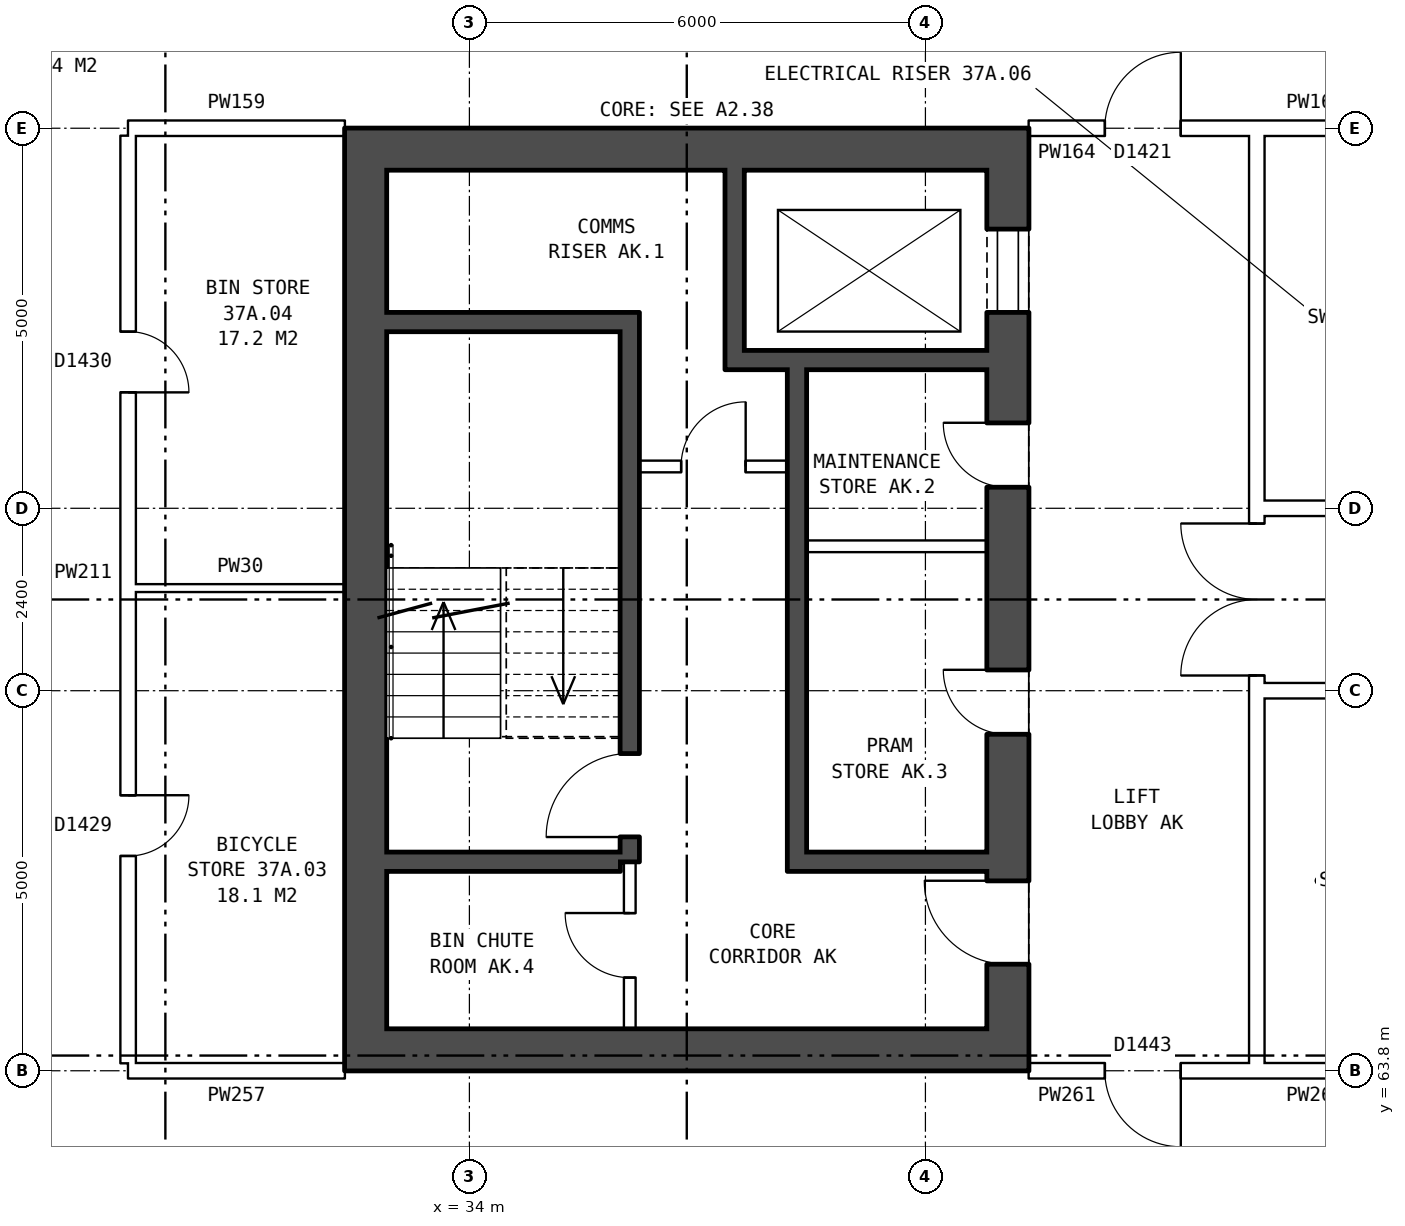
"""IFC4 building model, lengths in metres.
Left out: names, types, materials, properties, quantities, classifications, styles, units other than length and angle.
Written with IfcOpenShell. Run it as: python <this file> out.ifc"""

import sys

from ifc_helpers import new_model, si_unit, direction, frame, frame_2d, origin, place, context, subcontext, project, spatial, rectangle, extrude, element, fill, save


model = new_model("IFC4")
c1 = context("Model", 3, precision=1e-05, world=origin(), true_north=direction((0.0, 1.0)))
c2 = subcontext(c1, "Body", "Model", "MODEL_VIEW")
j1 = project(units=[si_unit("LENGTHUNIT", "METRE"), si_unit("PLANEANGLEUNIT", "RADIAN")], contexts=[c1])
p1 = place(None, origin())
s1 = spatial("IfcSite", under=j1, at=p1, CompositionType="ELEMENT")
p2 = place(p1, origin())
s2 = spatial("IfcBuilding", under=s1, at=p2, CompositionType="ELEMENT")
p3 = place(p2, frame((0.0, 0.0, 133.0)))
s3 = spatial("IfcBuildingStorey", under=s2, at=p3, CompositionType="ELEMENT", Elevation=133.0)
p4 = place(p3, frame((41.085, 76.2, 0.0), z_axis=(0.0, 0.0, 1.0), x_axis=(0.0, -1.0, 0.0)))
e1 = element("IfcWall", 1, at=p4, inside=s3, PredefinedType="SHEAR", context=c2, shape_type="SweptSolid", body=[
    extrude(rectangle(XDim=12.4, YDim=0.55, at=frame_2d((6.2, 0.0))), origin(), (0.0, 0.0, 1.0), 2.85),
])
p5 = place(p4, frame((1.325, 0.0, 0.0)))
e2 = element("IfcOpeningElement", 2, at=p5, cuts=e1, PredefinedType="OPENING", context=c2, shape_type="SweptSolid", body=[
    extrude(rectangle(XDim=1.1, YDim=2.1, at=frame_2d((0.55, 1.05))), frame((0.0, 0.285, 0.0), z_axis=(0.0, -1.0, 0.0), x_axis=(1.0, 0.0, 0.0)), (0.0, 0.0, 1.0), 0.57),
])
p6 = place(p4, frame((3.875, 0.0, 0.0)))
e3 = element("IfcOpeningElement", 3, at=p6, cuts=e1, PredefinedType="OPENING", context=c2, shape_type="SweptSolid", body=[
    extrude(rectangle(XDim=0.85, YDim=2.1, at=frame_2d((0.425, 1.05))), frame((0.0, 0.285, 0.0), z_axis=(0.0, -1.0, 0.0), x_axis=(1.0, 0.0, 0.0)), (0.0, 0.0, 1.0), 0.57),
])
p7 = place(p4, frame((7.125, 0.0, 0.0)))
e4 = element("IfcOpeningElement", 4, at=p7, cuts=e1, PredefinedType="OPENING", context=c2, shape_type="SweptSolid", body=[
    extrude(rectangle(XDim=0.85, YDim=2.1, at=frame_2d((0.425, 1.05))), frame((0.0, 0.285, 0.0), z_axis=(0.0, -1.0, 0.0), x_axis=(1.0, 0.0, 0.0)), (0.0, 0.0, 1.0), 0.57),
])
p8 = place(p4, frame((9.9, 0.0, 0.0)))
e5 = element("IfcOpeningElement", 5, at=p8, cuts=e1, PredefinedType="OPENING", context=c2, shape_type="SweptSolid", body=[
    extrude(rectangle(XDim=1.1, YDim=2.1, at=frame_2d((0.55, 1.05))), frame((0.0, 0.285, 0.0), z_axis=(0.0, -1.0, 0.0), x_axis=(1.0, 0.0, 0.0)), (0.0, 0.0, 1.0), 0.57),
])
p9 = place(p3, frame((32.635, 76.2, 0.0), z_axis=(0.0, 0.0, 1.0), x_axis=(0.0, -1.0, 0.0)))
e6 = element("IfcWall", 6, at=p9, inside=s3, PredefinedType="SHEAR", context=c2, shape_type="SweptSolid", body=[
    extrude(rectangle(XDim=12.4, YDim=0.55, at=frame_2d((6.2, 0.0))), origin(), (0.0, 0.0, 1.0), 2.85),
])
for number, where, z_axis, x_axis in (
    (7, (40.81, 75.925, 0.0), (0.0, 0.0, 1.0), (-1.0, 0.0, 0.0)),
    (8, (40.81, 64.075, 0.0), (0.0, 0.0, 1.0), (-1.0, 0.0, 0.0)),
):
    element("IfcWall", number, at=place(p3, frame(where, z_axis=z_axis, x_axis=x_axis)), inside=s3, PredefinedType="SHEAR", context=c2, shape_type="SweptSolid", body=[
        extrude(rectangle(XDim=7.9, YDim=0.55, at=frame_2d((3.95, 0.0))), origin(), (0.0, 0.0, 1.0), 2.85),
    ])
p10 = place(p3, frame((35.985, 73.65, 0.0), z_axis=(0.0, 0.0, 1.0), x_axis=(-1.0, 0.0, 0.0)))
e9 = element("IfcWall", 9, at=p10, inside=s3, PredefinedType="SHEAR", context=c2, shape_type="SweptSolid", body=[
    extrude(rectangle(XDim=3.075, YDim=0.25, at=frame_2d((1.538, 0.0))), origin(), (0.0, 0.0, 1.0), 2.85),
])
p11 = place(p3, frame((40.81, 73.15, 0.0), z_axis=(0.0, 0.0, 1.0), x_axis=(-1.0, 0.0, 0.0)))
e10 = element("IfcWall", 10, at=p11, inside=s3, PredefinedType="SHEAR", context=c2, shape_type="SweptSolid", body=[
    extrude(rectangle(XDim=3.445, YDim=0.25, at=frame_2d((1.723, 0.0))), origin(), (0.0, 0.0, 1.0), 2.85),
])
p12 = place(p3, frame((38.185, 71.75, 0.0), z_axis=(0.0, 0.0, 1.0), x_axis=(-1.0, 0.0, 0.0)))
e11 = element("IfcWall", 11, at=p12, inside=s3, PredefinedType="PARTITIONING", context=c2, shape_type="SweptSolid", body=[
    extrude(rectangle(XDim=1.95, YDim=0.15, at=frame_2d((0.975, 0.0))), origin(), (0.0, 0.0, 1.0), 2.85),
])
p13 = place(p12, frame((0.55, 0.0, 0.0)))
e12 = element("IfcOpeningElement", 12, at=p13, cuts=e11, PredefinedType="OPENING", context=c2, shape_type="SweptSolid", body=[
    extrude(rectangle(XDim=0.85, YDim=2.1, at=frame_2d((0.425, 1.05))), frame((0.0, 0.085, 0.0), z_axis=(0.0, -1.0, 0.0), x_axis=(1.0, 0.0, 0.0)), (0.0, 0.0, 1.0), 0.17),
])
p14 = place(p3, frame((40.81, 70.7, 0.0), z_axis=(0.0, 0.0, 1.0), x_axis=(-1.0, 0.0, 0.0)))
e13 = element("IfcWall", 13, at=p14, inside=s3, PredefinedType="PARTITIONING", context=c2, shape_type="SweptSolid", body=[
    extrude(rectangle(XDim=2.375, YDim=0.15, at=frame_2d((1.188, 0.0))), origin(), (0.0, 0.0, 1.0), 2.85),
])
p15 = place(p3, frame((40.81, 66.55, 0.0), z_axis=(0.0, 0.0, 1.0), x_axis=(-1.0, 0.0, 0.0)))
e14 = element("IfcWall", 14, at=p15, inside=s3, PredefinedType="SHEAR", context=c2, shape_type="SweptSolid", body=[
    extrude(rectangle(XDim=2.375, YDim=0.25, at=frame_2d((1.188, 0.0))), origin(), (0.0, 0.0, 1.0), 2.85),
])
p16 = place(p3, frame((35.985, 66.55, 0.0), z_axis=(0.0, 0.0, 1.0), x_axis=(-1.0, 0.0, 0.0)))
e15 = element("IfcWall", 15, at=p16, inside=s3, PredefinedType="SHEAR", context=c2, shape_type="SweptSolid", body=[
    extrude(rectangle(XDim=3.075, YDim=0.25, at=frame_2d((1.538, 0.0))), origin(), (0.0, 0.0, 1.0), 2.85),
])
p17 = place(p3, frame((38.31, 73.025, 0.0), z_axis=(0.0, 0.0, 1.0), x_axis=(0.0, -1.0, 0.0)))
e16 = element("IfcWall", 16, at=p17, inside=s3, PredefinedType="SHEAR", context=c2, shape_type="SweptSolid", body=[
    extrude(rectangle(XDim=6.6, YDim=0.25, at=frame_2d((3.3, 0.0))), origin(), (0.0, 0.0, 1.0), 2.85),
])
p18 = place(p3, frame((37.49, 75.65, 0.0), z_axis=(0.0, 0.0, 1.0), x_axis=(0.0, -1.0, 0.0)))
e17 = element("IfcWall", 17, at=p18, inside=s3, PredefinedType="SHEAR", context=c2, shape_type="SweptSolid", body=[
    extrude(rectangle(XDim=2.375, YDim=0.25, at=frame_2d((1.188, 0.0))), origin(), (0.0, 0.0, 1.0), 2.85),
])
p19 = place(p3, frame((36.11, 73.775, 0.0), z_axis=(0.0, 0.0, 1.0), x_axis=(0.0, -1.0, 0.0)))
e18 = element("IfcWall", 18, at=p19, inside=s3, PredefinedType="SHEAR", context=c2, shape_type="SweptSolid", body=[
    extrude(rectangle(XDim=7.225, YDim=0.25, at=frame_2d((3.612, 0.0))), origin(), (0.0, 0.0, 1.0), 2.85),
])
p20 = place(p19, frame((5.8, 0.0, 0.0)))
e19 = element("IfcOpeningElement", 19, at=p20, cuts=e18, PredefinedType="OPENING", context=c2, shape_type="SweptSolid", body=[
    extrude(rectangle(XDim=1.1, YDim=2.1, at=frame_2d((0.55, 1.05))), frame((0.0, 0.135, 0.0), z_axis=(0.0, -1.0, 0.0), x_axis=(1.0, 0.0, 0.0)), (0.0, 0.0, 1.0), 0.27),
])
p21 = place(p3, frame((36.11, 66.55, 0.0), z_axis=(0.0, 0.0, 1.0), x_axis=(0.0, -1.0, 0.0)))
e20 = element("IfcWall", 20, at=p21, inside=s3, PredefinedType="PARTITIONING", context=c2, shape_type="SweptSolid", body=[
    extrude(rectangle(XDim=2.2, YDim=0.15, at=frame_2d((1.1, 0.0))), origin(), (0.0, 0.0, 1.0), 2.85),
])
p22 = place(p21, frame((0.675, 0.0, 0.0)))
e21 = element("IfcOpeningElement", 21, at=p22, cuts=e20, PredefinedType="OPENING", context=c2, shape_type="SweptSolid", body=[
    extrude(rectangle(XDim=0.85, YDim=2.1, at=frame_2d((0.425, 1.05))), frame((0.0, 0.085, 0.0), z_axis=(0.0, -1.0, 0.0), x_axis=(1.0, 0.0, 0.0)), (0.0, 0.0, 1.0), 0.17),
])
p23 = place(p3, frame((44.36, 63.9, 0.0), z_axis=(0.0, 0.0, 1.0), x_axis=(0.0, 1.0, 0.0)))
e22 = element("IfcWall", 22, at=p23, inside=s3, PredefinedType="PARTITIONING", context=c2, shape_type="SweptSolid", body=[
    extrude(rectangle(XDim=12.2, YDim=0.2, at=frame_2d((6.1, 0.0))), origin(), (0.0, 0.0, 1.0), 2.85),
])
p24 = place(p23, frame((5.1, 0.0, 0.0)))
e23 = element("IfcOpeningElement", 23, at=p24, cuts=e22, PredefinedType="OPENING", context=c2, shape_type="SweptSolid", body=[
    extrude(rectangle(XDim=2.0, YDim=2.1, at=frame_2d((1.0, 1.05))), frame((0.0, 0.11, 0.0), z_axis=(0.0, -1.0, 0.0), x_axis=(1.0, 0.0, 0.0)), (0.0, 0.0, 1.0), 0.22),
])
p25 = place(p3, frame((29.51, 63.8, 0.0), z_axis=(0.0, 0.0, 1.0), x_axis=(1.0, 0.0, 0.0)))
e24 = element("IfcWall", 24, at=p25, inside=s3, PredefinedType="PARTITIONING", context=c2, shape_type="SweptSolid", body=[
    extrude(rectangle(XDim=2.85, YDim=0.2, at=frame_2d((1.425, 0.0))), origin(), (0.0, 0.0, 1.0), 2.85),
])
p26 = place(p3, frame((41.36, 63.8, 0.0), z_axis=(0.0, 0.0, 1.0), x_axis=(1.0, 0.0, 0.0)))
e25 = element("IfcWall", 25, at=p26, inside=s3, PredefinedType="PARTITIONING", context=c2, shape_type="SweptSolid", body=[
    extrude(rectangle(XDim=3.0, YDim=0.2, at=frame_2d((1.5, 0.0))), origin(), (0.0, 0.0, 1.0), 2.85),
])
p27 = place(p26, frame((1.0, 0.0, 0.0)))
e26 = element("IfcOpeningElement", 26, at=p27, cuts=e25, PredefinedType="OPENING", context=c2, shape_type="SweptSolid", body=[
    extrude(rectangle(XDim=1.0, YDim=2.1, at=frame_2d((0.5, 1.05))), frame((0.0, 0.11, 0.0), z_axis=(0.0, -1.0, 0.0), x_axis=(1.0, 0.0, 0.0)), (0.0, 0.0, 1.0), 0.22),
])
p28 = place(p3, frame((44.36, 63.8, 0.0), z_axis=(0.0, 0.0, 1.0), x_axis=(1.0, 0.0, 0.0)))
e27 = element("IfcWall", 27, at=p28, inside=s3, PredefinedType="PARTITIONING", context=c2, shape_type="SweptSolid", body=[
    extrude(rectangle(XDim=1.54, YDim=0.2, at=frame_2d((0.77, 0.0))), origin(), (0.0, 0.0, 1.0), 2.85),
])
p29 = place(p3, frame((44.36, 68.8, 0.0), z_axis=(0.0, 0.0, 1.0), x_axis=(1.0, 0.0, 0.0)))
e28 = element("IfcWall", 28, at=p29, inside=s3, PredefinedType="PARTITIONING", context=c2, shape_type="SweptSolid", body=[
    extrude(rectangle(XDim=19.28, YDim=0.2, at=frame_2d((9.64, 0.0))), origin(), (0.0, 0.0, 1.0), 2.85),
])
p30 = place(p29, frame((14.64, 0.0, 0.0)))
e29 = element("IfcOpeningElement", 29, at=p30, cuts=e28, PredefinedType="OPENING", context=c2, shape_type="SweptSolid", body=[
    extrude(rectangle(XDim=1.0, YDim=2.1, at=frame_2d((0.5, 1.05))), frame((0.0, 0.11, 0.0), z_axis=(0.0, -1.0, 0.0), x_axis=(1.0, 0.0, 0.0)), (0.0, 0.0, 1.0), 0.22),
])
p31 = place(p29, frame((8.64, 0.0, 0.0)))
e30 = element("IfcOpeningElement", 30, at=p31, cuts=e28, PredefinedType="OPENING", context=c2, shape_type="SweptSolid", body=[
    extrude(rectangle(XDim=1.0, YDim=2.1, at=frame_2d((0.5, 1.05))), frame((0.0, 0.11, 0.0), z_axis=(0.0, -1.0, 0.0), x_axis=(1.0, 0.0, 0.0)), (0.0, 0.0, 1.0), 0.22),
])
p32 = place(p29, frame((2.64, 0.0, 0.0)))
e31 = element("IfcOpeningElement", 31, at=p32, cuts=e28, PredefinedType="OPENING", context=c2, shape_type="SweptSolid", body=[
    extrude(rectangle(XDim=1.0, YDim=2.1, at=frame_2d((0.5, 1.05))), frame((0.0, 0.11, 0.0), z_axis=(0.0, -1.0, 0.0), x_axis=(1.0, 0.0, 0.0)), (0.0, 0.0, 1.0), 0.22),
])
p33 = place(p3, frame((29.61, 70.15, 0.0), z_axis=(0.0, 0.0, 1.0), x_axis=(1.0, 0.0, 0.0)))
e32 = element("IfcWall", 32, at=p33, inside=s3, PredefinedType="PARTITIONING", context=c2, shape_type="SweptSolid", body=[
    extrude(rectangle(XDim=2.75, YDim=0.1, at=frame_2d((1.375, 0.0))), origin(), (0.0, 0.0, 1.0), 2.85),
])
p34 = place(p3, frame((44.36, 71.2, 0.0), z_axis=(0.0, 0.0, 1.0), x_axis=(1.0, 0.0, 0.0)))
e33 = element("IfcWall", 33, at=p34, inside=s3, PredefinedType="PARTITIONING", context=c2, shape_type="SweptSolid", body=[
    extrude(rectangle(XDim=19.28, YDim=0.2, at=frame_2d((9.64, 0.0))), origin(), (0.0, 0.0, 1.0), 2.85),
])
p35 = place(p34, frame((17.46, 0.0, 0.0)))
e34 = element("IfcOpeningElement", 34, at=p35, cuts=e33, PredefinedType="OPENING", context=c2, shape_type="SweptSolid", body=[
    extrude(rectangle(XDim=1.0, YDim=2.1, at=frame_2d((0.5, 1.05))), frame((0.0, 0.11, 0.0), z_axis=(0.0, -1.0, 0.0), x_axis=(1.0, 0.0, 0.0)), (0.0, 0.0, 1.0), 0.22),
])
p36 = place(p34, frame((8.64, 0.0, 0.0)))
e35 = element("IfcOpeningElement", 35, at=p36, cuts=e33, PredefinedType="OPENING", context=c2, shape_type="SweptSolid", body=[
    extrude(rectangle(XDim=1.0, YDim=2.1, at=frame_2d((0.5, 1.05))), frame((0.0, 0.11, 0.0), z_axis=(0.0, -1.0, 0.0), x_axis=(1.0, 0.0, 0.0)), (0.0, 0.0, 1.0), 0.22),
])
p37 = place(p34, frame((2.64, 0.0, 0.0)))
e36 = element("IfcOpeningElement", 36, at=p37, cuts=e33, PredefinedType="OPENING", context=c2, shape_type="SweptSolid", body=[
    extrude(rectangle(XDim=1.0, YDim=2.1, at=frame_2d((0.5, 1.05))), frame((0.0, 0.11, 0.0), z_axis=(0.0, -1.0, 0.0), x_axis=(1.0, 0.0, 0.0)), (0.0, 0.0, 1.0), 0.22),
])
p38 = place(p3, frame((29.51, 76.2, 0.0), z_axis=(0.0, 0.0, 1.0), x_axis=(1.0, 0.0, 0.0)))
e37 = element("IfcWall", 37, at=p38, inside=s3, PredefinedType="PARTITIONING", context=c2, shape_type="SweptSolid", body=[
    extrude(rectangle(XDim=2.85, YDim=0.2, at=frame_2d((1.425, 0.0))), origin(), (0.0, 0.0, 1.0), 2.85),
])
p39 = place(p3, frame((41.36, 76.2, 0.0), z_axis=(0.0, 0.0, 1.0), x_axis=(1.0, 0.0, 0.0)))
e38 = element("IfcWall", 38, at=p39, inside=s3, PredefinedType="PARTITIONING", context=c2, shape_type="SweptSolid", body=[
    extrude(rectangle(XDim=3.0, YDim=0.2, at=frame_2d((1.5, 0.0))), origin(), (0.0, 0.0, 1.0), 2.85),
])
p40 = place(p39, frame((1.0, 0.0, 0.0)))
e39 = element("IfcOpeningElement", 39, at=p40, cuts=e38, PredefinedType="OPENING", context=c2, shape_type="SweptSolid", body=[
    extrude(rectangle(XDim=1.0, YDim=2.1, at=frame_2d((0.5, 1.05))), frame((0.0, 0.11, 0.0), z_axis=(0.0, -1.0, 0.0), x_axis=(1.0, 0.0, 0.0)), (0.0, 0.0, 1.0), 0.22),
])
p41 = place(p3, frame((44.36, 76.2, 0.0), z_axis=(0.0, 0.0, 1.0), x_axis=(1.0, 0.0, 0.0)))
e40 = element("IfcWall", 40, at=p41, inside=s3, PredefinedType="PARTITIONING", context=c2, shape_type="SweptSolid", body=[
    extrude(rectangle(XDim=1.54, YDim=0.2, at=frame_2d((0.77, 0.0))), origin(), (0.0, 0.0, 1.0), 2.85),
])
p42 = place(p3, frame((29.51, 63.9, 0.0), z_axis=(0.0, 0.0, 1.0), x_axis=(0.0, 1.0, 0.0)))
e41 = element("IfcWall", 41, at=p42, inside=s3, PredefinedType="PARTITIONING", context=c2, shape_type="SweptSolid", body=[
    extrude(rectangle(XDim=12.2, YDim=0.2, at=frame_2d((6.1, 0.0))), origin(), (0.0, 0.0, 1.0), 2.85),
])
p43 = place(p42, frame((2.725, 0.0, 0.0)))
e42 = element("IfcOpeningElement", 42, at=p43, cuts=e41, PredefinedType="OPENING", context=c2, shape_type="SweptSolid", body=[
    extrude(rectangle(XDim=0.8, YDim=2.1, at=frame_2d((0.4, 1.05))), frame((0.0, 0.11, 0.0), z_axis=(0.0, -1.0, 0.0), x_axis=(1.0, 0.0, 0.0)), (0.0, 0.0, 1.0), 0.22),
])
p44 = place(p42, frame((8.825, 0.0, 0.0)))
e43 = element("IfcOpeningElement", 43, at=p44, cuts=e41, PredefinedType="OPENING", context=c2, shape_type="SweptSolid", body=[
    extrude(rectangle(XDim=0.8, YDim=2.1, at=frame_2d((0.4, 1.05))), frame((0.0, 0.11, 0.0), z_axis=(0.0, -1.0, 0.0), x_axis=(1.0, 0.0, 0.0)), (0.0, 0.0, 1.0), 0.22),
])
p45 = place(p5, origin())
e44 = element("IfcDoor", 44, at=p45, inside=s3, OperationType="DOUBLE_DOOR_SLIDING", PredefinedType="DOOR", context=c2, shape_type="SweptSolid", body=[
    extrude(rectangle(XDim=1.1, YDim=2.1, at=frame_2d((0.55, 1.05))), frame((0.0, -0.21, 0.0), z_axis=(0.0, -1.0, 0.0), x_axis=(1.0, 0.0, 0.0)), (0.0, 0.0, 1.0), 0.05),
])
fill(e2, e44)
p46 = place(p6, frame((0.85, 0.0, 0.0), z_axis=(0.0, 0.0, 1.0), x_axis=(-1.0, 0.0, 0.0)))
e45 = element("IfcDoor", 45, at=p46, inside=s3, OperationType="SINGLE_SWING_RIGHT", PredefinedType="DOOR", context=c2, shape_type="SweptSolid", body=[
    extrude(rectangle(XDim=0.85, YDim=2.1, at=frame_2d((0.425, 1.05))), frame((0.0, 0.26, 0.0), z_axis=(0.0, -1.0, 0.0), x_axis=(1.0, 0.0, 0.0)), (0.0, 0.0, 1.0), 0.05),
])
fill(e3, e45)
p47 = place(p7, frame((0.85, 0.0, 0.0), z_axis=(0.0, 0.0, 1.0), x_axis=(-1.0, 0.0, 0.0)))
e46 = element("IfcDoor", 46, at=p47, inside=s3, OperationType="SINGLE_SWING_RIGHT", PredefinedType="DOOR", context=c2, shape_type="SweptSolid", body=[
    extrude(rectangle(XDim=0.85, YDim=2.1, at=frame_2d((0.425, 1.05))), frame((0.0, 0.26, 0.0), z_axis=(0.0, -1.0, 0.0), x_axis=(1.0, 0.0, 0.0)), (0.0, 0.0, 1.0), 0.05),
])
fill(e4, e46)
p48 = place(p8, frame((1.1, 0.0, 0.0), z_axis=(0.0, 0.0, 1.0), x_axis=(-1.0, 0.0, 0.0)))
e47 = element("IfcDoor", 47, at=p48, inside=s3, OperationType="SINGLE_SWING_RIGHT", PredefinedType="DOOR", context=c2, shape_type="SweptSolid", body=[
    extrude(rectangle(XDim=1.1, YDim=2.1, at=frame_2d((0.55, 1.05))), frame((0.0, 0.26, 0.0), z_axis=(0.0, -1.0, 0.0), x_axis=(1.0, 0.0, 0.0)), (0.0, 0.0, 1.0), 0.05),
])
fill(e5, e47)
p49 = place(p20, frame((1.1, 0.0, 0.0), z_axis=(0.0, 0.0, 1.0), x_axis=(-1.0, 0.0, 0.0)))
e48 = element("IfcDoor", 48, at=p49, inside=s3, OperationType="SINGLE_SWING_LEFT", PredefinedType="DOOR", context=c2, shape_type="SweptSolid", body=[
    extrude(rectangle(XDim=1.1, YDim=2.1, at=frame_2d((0.55, 1.05))), frame((0.0, 0.025, 0.0), z_axis=(0.0, -1.0, 0.0), x_axis=(1.0, 0.0, 0.0)), (0.0, 0.0, 1.0), 0.05),
])
fill(e19, e48)
p50 = place(p13, frame((0.85, 0.0, 0.0), z_axis=(0.0, 0.0, 1.0), x_axis=(-1.0, 0.0, 0.0)))
e49 = element("IfcDoor", 49, at=p50, inside=s3, OperationType="SINGLE_SWING_RIGHT", PredefinedType="DOOR", context=c2, shape_type="SweptSolid", body=[
    extrude(rectangle(XDim=0.85, YDim=2.1, at=frame_2d((0.425, 1.05))), frame((0.0, 0.025, 0.0), z_axis=(0.0, -1.0, 0.0), x_axis=(1.0, 0.0, 0.0)), (0.0, 0.0, 1.0), 0.05),
])
fill(e12, e49)
p51 = place(p22, frame((0.85, 0.0, 0.0), z_axis=(0.0, 0.0, 1.0), x_axis=(-1.0, 0.0, 0.0)))
e50 = element("IfcDoor", 50, at=p51, inside=s3, OperationType="SINGLE_SWING_RIGHT", PredefinedType="DOOR", context=c2, shape_type="SweptSolid", body=[
    extrude(rectangle(XDim=0.85, YDim=2.1, at=frame_2d((0.425, 1.05))), frame((0.0, 0.025, 0.0), z_axis=(0.0, -1.0, 0.0), x_axis=(1.0, 0.0, 0.0)), (0.0, 0.0, 1.0), 0.05),
])
fill(e21, e50)
p52 = place(p24, origin())
e51 = element("IfcDoor", 51, at=p52, inside=s3, OperationType="DOUBLE_DOOR_SINGLE_SWING", PredefinedType="DOOR", context=c2, shape_type="SweptSolid", body=[
    extrude(rectangle(XDim=2.0, YDim=2.1, at=frame_2d((1.0, 1.05))), frame((0.0, 0.025, 0.0), z_axis=(0.0, -1.0, 0.0), x_axis=(1.0, 0.0, 0.0)), (0.0, 0.0, 1.0), 0.05),
])
fill(e23, e51)
p53 = place(p27, frame((1.0, 0.0, 0.0), z_axis=(0.0, 0.0, 1.0), x_axis=(-1.0, 0.0, 0.0)))
e52 = element("IfcDoor", 52, at=p53, inside=s3, OperationType="SINGLE_SWING_LEFT", PredefinedType="DOOR", context=c2, shape_type="SweptSolid", body=[
    extrude(rectangle(XDim=1.0, YDim=2.1, at=frame_2d((0.5, 1.05))), frame((0.0, 0.025, 0.0), z_axis=(0.0, -1.0, 0.0), x_axis=(1.0, 0.0, 0.0)), (0.0, 0.0, 1.0), 0.05),
])
fill(e26, e52)
p54 = place(p40, origin())
e53 = element("IfcDoor", 53, at=p54, inside=s3, OperationType="SINGLE_SWING_RIGHT", PredefinedType="DOOR", context=c2, shape_type="SweptSolid", body=[
    extrude(rectangle(XDim=1.0, YDim=2.1, at=frame_2d((0.5, 1.05))), frame((0.0, 0.025, 0.0), z_axis=(0.0, -1.0, 0.0), x_axis=(1.0, 0.0, 0.0)), (0.0, 0.0, 1.0), 0.05),
])
fill(e39, e53)
p55 = place(p43, frame((0.8, 0.0, 0.0), z_axis=(0.0, 0.0, 1.0), x_axis=(-1.0, 0.0, 0.0)))
e54 = element("IfcDoor", 54, at=p55, inside=s3, OperationType="SINGLE_SWING_LEFT", PredefinedType="DOOR", context=c2, shape_type="SweptSolid", body=[
    extrude(rectangle(XDim=0.8, YDim=2.1, at=frame_2d((0.4, 1.05))), frame((0.0, 0.025, 0.0), z_axis=(0.0, -1.0, 0.0), x_axis=(1.0, 0.0, 0.0)), (0.0, 0.0, 1.0), 0.05),
])
fill(e42, e54)
p56 = place(p44, frame((0.8, 0.0, 0.0), z_axis=(0.0, 0.0, 1.0), x_axis=(-1.0, 0.0, 0.0)))
e55 = element("IfcDoor", 55, at=p56, inside=s3, OperationType="SINGLE_SWING_RIGHT", PredefinedType="DOOR", context=c2, shape_type="SweptSolid", body=[
    extrude(rectangle(XDim=0.8, YDim=2.1, at=frame_2d((0.4, 1.05))), frame((0.0, 0.025, 0.0), z_axis=(0.0, -1.0, 0.0), x_axis=(1.0, 0.0, 0.0)), (0.0, 0.0, 1.0), 0.05),
])
fill(e43, e55)
save(model, sys.argv[1])
